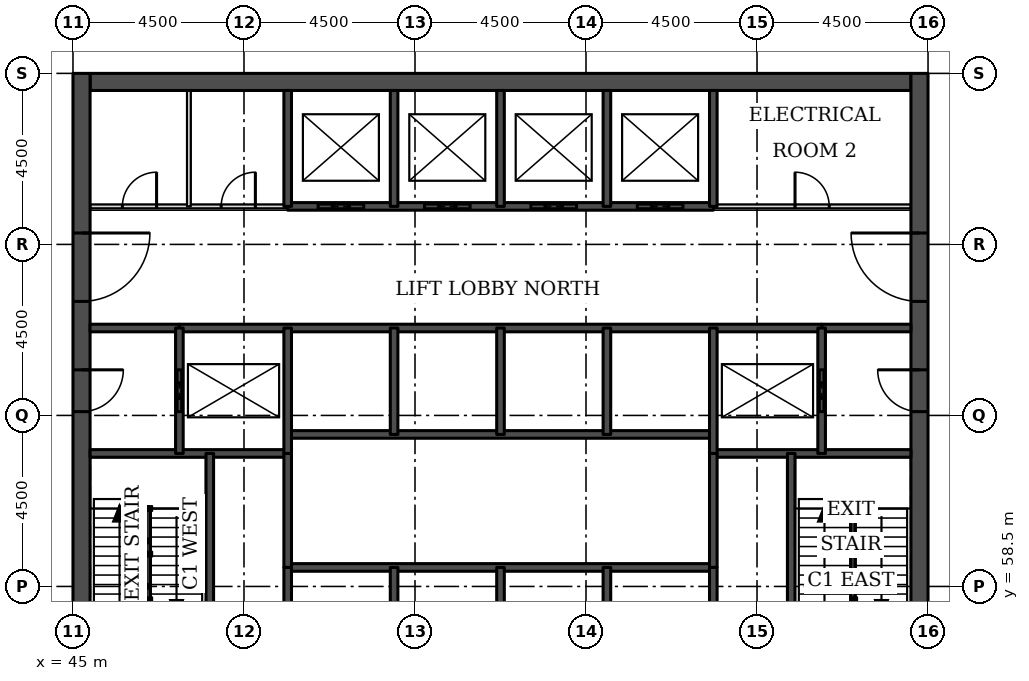
"""IFC4 building model, lengths in metres.
Left out: names, types, materials, properties, quantities, classifications, styles, units other than length and angle.
Written with IfcOpenShell. Run it as: python <this file> out.ifc"""

import sys

from ifc_helpers import new_model, si_unit, direction, frame, frame_2d, origin, place, context, subcontext, project, spatial, rectangle, extrude, element, fill, save


model = new_model("IFC4")
c1 = context("Model", 3, precision=1e-05, world=origin(), true_north=direction((0.0, 1.0)))
c2 = subcontext(c1, "Body", "Model", "MODEL_VIEW")
j1 = project(units=[si_unit("LENGTHUNIT", "METRE"), si_unit("PLANEANGLEUNIT", "RADIAN")], contexts=[c1])
p1 = place(None, origin())
s1 = spatial("IfcSite", under=j1, at=p1, CompositionType="ELEMENT")
p2 = place(p1, origin())
s2 = spatial("IfcBuilding", under=s1, at=p2, CompositionType="ELEMENT")
p3 = place(p2, frame((0.0, 0.0, 127.0)))
s3 = spatial("IfcBuildingStorey", under=s2, at=p3, CompositionType="ELEMENT", Elevation=127.0)
p4 = place(p3, frame((45.45, 71.775, 0.0), z_axis=(0.0, 0.0, 1.0), x_axis=(1.0, 0.0, 0.0)))
e1 = element("IfcWall", 1, at=p4, inside=s3, PredefinedType="SHEAR", context=c2, shape_type="SweptSolid", body=[
    extrude(rectangle(XDim=21.6, YDim=0.45, at=frame_2d((10.8, 0.0))), origin(), (0.0, 0.0, 1.0), 3.7),
])
p5 = place(p3, frame((45.225, 49.5, 0.0), z_axis=(0.0, 0.0, 1.0), x_axis=(0.0, 1.0, 0.0)))
e2 = element("IfcWall", 2, at=p5, inside=s3, PredefinedType="SHEAR", context=c2, shape_type="SweptSolid", body=[
    extrude(rectangle(XDim=22.5, YDim=0.45, at=frame_2d((11.25, 0.0))), origin(), (0.0, 0.0, 1.0), 3.7),
])
p6 = place(p5, frame((4.2, 0.0, 0.0)))
e3 = element("IfcOpeningElement", 3, at=p6, cuts=e2, PredefinedType="OPENING", context=c2, shape_type="SweptSolid", body=[
    extrude(rectangle(XDim=1.8, YDim=2.1, at=frame_2d((0.9, 1.05))), frame((0.0, 0.235, 0.0), z_axis=(0.0, -1.0, 0.0), x_axis=(1.0, 0.0, 0.0)), (0.0, 0.0, 1.0), 0.47),
])
p7 = place(p5, frame((6.9, 0.0, 0.0)))
e4 = element("IfcOpeningElement", 4, at=p7, cuts=e2, PredefinedType="OPENING", context=c2, shape_type="SweptSolid", body=[
    extrude(rectangle(XDim=1.1, YDim=2.1, at=frame_2d((0.55, 1.05))), frame((0.0, 0.235, 0.0), z_axis=(0.0, -1.0, 0.0), x_axis=(1.0, 0.0, 0.0)), (0.0, 0.0, 1.0), 0.47),
])
p8 = place(p5, frame((13.6, 0.0, 0.0)))
e5 = element("IfcOpeningElement", 5, at=p8, cuts=e2, PredefinedType="OPENING", context=c2, shape_type="SweptSolid", body=[
    extrude(rectangle(XDim=1.1, YDim=2.1, at=frame_2d((0.55, 1.05))), frame((0.0, 0.235, 0.0), z_axis=(0.0, -1.0, 0.0), x_axis=(1.0, 0.0, 0.0)), (0.0, 0.0, 1.0), 0.47),
])
p9 = place(p5, frame((16.5, 0.0, 0.0)))
e6 = element("IfcOpeningElement", 6, at=p9, cuts=e2, PredefinedType="OPENING", context=c2, shape_type="SweptSolid", body=[
    extrude(rectangle(XDim=1.8, YDim=2.1, at=frame_2d((0.9, 1.05))), frame((0.0, 0.235, 0.0), z_axis=(0.0, -1.0, 0.0), x_axis=(1.0, 0.0, 0.0)), (0.0, 0.0, 1.0), 0.47),
])
p10 = place(p3, frame((67.275, 49.5, 0.0), z_axis=(0.0, 0.0, 1.0), x_axis=(0.0, 1.0, 0.0)))
e7 = element("IfcWall", 7, at=p10, inside=s3, PredefinedType="SHEAR", context=c2, shape_type="SweptSolid", body=[
    extrude(rectangle(XDim=22.5, YDim=0.45, at=frame_2d((11.25, 0.0))), origin(), (0.0, 0.0, 1.0), 3.7),
])
p11 = place(p10, frame((4.2, 0.0, 0.0)))
e8 = element("IfcOpeningElement", 8, at=p11, cuts=e7, PredefinedType="OPENING", context=c2, shape_type="SweptSolid", body=[
    extrude(rectangle(XDim=1.8, YDim=2.1, at=frame_2d((0.9, 1.05))), frame((0.0, 0.235, 0.0), z_axis=(0.0, -1.0, 0.0), x_axis=(1.0, 0.0, 0.0)), (0.0, 0.0, 1.0), 0.47),
])
p12 = place(p10, frame((6.9, 0.0, 0.0)))
e9 = element("IfcOpeningElement", 9, at=p12, cuts=e7, PredefinedType="OPENING", context=c2, shape_type="SweptSolid", body=[
    extrude(rectangle(XDim=1.1, YDim=2.1, at=frame_2d((0.55, 1.05))), frame((0.0, 0.235, 0.0), z_axis=(0.0, -1.0, 0.0), x_axis=(1.0, 0.0, 0.0)), (0.0, 0.0, 1.0), 0.47),
])
p13 = place(p10, frame((13.6, 0.0, 0.0)))
e10 = element("IfcOpeningElement", 10, at=p13, cuts=e7, PredefinedType="OPENING", context=c2, shape_type="SweptSolid", body=[
    extrude(rectangle(XDim=1.1, YDim=2.1, at=frame_2d((0.55, 1.05))), frame((0.0, 0.235, 0.0), z_axis=(0.0, -1.0, 0.0), x_axis=(1.0, 0.0, 0.0)), (0.0, 0.0, 1.0), 0.47),
])
p14 = place(p10, frame((16.5, 0.0, 0.0)))
e11 = element("IfcOpeningElement", 11, at=p14, cuts=e7, PredefinedType="OPENING", context=c2, shape_type="SweptSolid", body=[
    extrude(rectangle(XDim=1.8, YDim=2.1, at=frame_2d((0.9, 1.05))), frame((0.0, 0.235, 0.0), z_axis=(0.0, -1.0, 0.0), x_axis=(1.0, 0.0, 0.0)), (0.0, 0.0, 1.0), 0.47),
])
p15 = place(p3, frame((50.65, 59.0, 0.0), z_axis=(0.0, 0.0, 1.0), x_axis=(1.0, 0.0, 0.0)))
e12 = element("IfcWall", 12, at=p15, inside=s3, PredefinedType="SOLIDWALL", context=c2, shape_type="SweptSolid", body=[
    extrude(rectangle(XDim=11.2, YDim=0.2, at=frame_2d((5.6, 0.0))), origin(), (0.0, 0.0, 1.0), 3.7),
])
for number, where, z_axis, x_axis in (
    (13, (45.45, 62.0, 0.0), (0.0, 0.0, 1.0), (1.0, 0.0, 0.0)),
    (14, (61.85, 62.0, 0.0), (0.0, 0.0, 1.0), (1.0, 0.0, 0.0)),
):
    element("IfcWall", number, at=place(p3, frame(where, z_axis=z_axis, x_axis=x_axis)), inside=s3, PredefinedType="SOLIDWALL", context=c2, shape_type="SweptSolid", body=[
        extrude(rectangle(XDim=5.2, YDim=0.2, at=frame_2d((2.6, 0.0))), origin(), (0.0, 0.0, 1.0), 3.55),
    ])
p16 = place(p3, frame((50.65, 62.5, 0.0), z_axis=(0.0, 0.0, 1.0), x_axis=(1.0, 0.0, 0.0)))
e15 = element("IfcWall", 15, at=p16, inside=s3, PredefinedType="SOLIDWALL", context=c2, shape_type="SweptSolid", body=[
    extrude(rectangle(XDim=11.2, YDim=0.2, at=frame_2d((5.6, 0.0))), origin(), (0.0, 0.0, 1.0), 3.7),
])
for number, where, z_axis, x_axis in (
    (16, (45.45, 65.3, 0.0), (0.0, 0.0, 1.0), (1.0, 0.0, 0.0)),
    (17, (64.7, 65.3, 0.0), (0.0, 0.0, 1.0), (1.0, 0.0, 0.0)),
):
    element("IfcWall", number, at=place(p3, frame(where, z_axis=z_axis, x_axis=x_axis)), inside=s3, PredefinedType="SOLIDWALL", context=c2, shape_type="SweptSolid", body=[
        extrude(rectangle(XDim=2.35, YDim=0.2, at=frame_2d((1.175, 0.0))), origin(), (0.0, 0.0, 1.0), 3.55),
    ])
p17 = place(p3, frame((47.8, 65.3, 0.0), z_axis=(0.0, 0.0, 1.0), x_axis=(1.0, 0.0, 0.0)))
e18 = element("IfcWall", 18, at=p17, inside=s3, PredefinedType="SOLIDWALL", context=c2, shape_type="SweptSolid", body=[
    extrude(rectangle(XDim=16.9, YDim=0.2, at=frame_2d((8.45, 0.0))), origin(), (0.0, 0.0, 1.0), 3.55),
])
p18 = place(p3, frame((45.45, 68.5, 0.0), z_axis=(0.0, 0.0, 1.0), x_axis=(1.0, 0.0, 0.0)))
e19 = element("IfcWall", 19, at=p18, inside=s3, PredefinedType="PARTITIONING", context=c2, shape_type="SweptSolid", body=[
    extrude(rectangle(XDim=5.2, YDim=0.1, at=frame_2d((2.6, 0.0))), origin(), (0.0, 0.0, 1.0), 3.55),
])
p19 = place(p18, frame((0.85, 0.0, 0.0)))
e20 = element("IfcOpeningElement", 20, at=p19, cuts=e19, PredefinedType="OPENING", context=c2, shape_type="SweptSolid", body=[
    extrude(rectangle(XDim=0.9, YDim=2.1, at=frame_2d((0.45, 1.05))), frame((0.0, 0.06, 0.0), z_axis=(0.0, -1.0, 0.0), x_axis=(1.0, 0.0, 0.0)), (0.0, 0.0, 1.0), 0.12),
])
p20 = place(p18, frame((3.45, 0.0, 0.0)))
e21 = element("IfcOpeningElement", 21, at=p20, cuts=e19, PredefinedType="OPENING", context=c2, shape_type="SweptSolid", body=[
    extrude(rectangle(XDim=0.9, YDim=2.1, at=frame_2d((0.45, 1.05))), frame((0.0, 0.06, 0.0), z_axis=(0.0, -1.0, 0.0), x_axis=(1.0, 0.0, 0.0)), (0.0, 0.0, 1.0), 0.12),
])
p21 = place(p3, frame((61.85, 68.5, 0.0), z_axis=(0.0, 0.0, 1.0), x_axis=(1.0, 0.0, 0.0)))
e22 = element("IfcWall", 22, at=p21, inside=s3, PredefinedType="PARTITIONING", context=c2, shape_type="SweptSolid", body=[
    extrude(rectangle(XDim=5.2, YDim=0.1, at=frame_2d((2.6, 0.0))), origin(), (0.0, 0.0, 1.0), 3.55),
])
p22 = place(p21, frame((2.15, 0.0, 0.0)))
e23 = element("IfcOpeningElement", 23, at=p22, cuts=e22, PredefinedType="OPENING", context=c2, shape_type="SweptSolid", body=[
    extrude(rectangle(XDim=0.9, YDim=2.1, at=frame_2d((0.45, 1.05))), frame((0.0, 0.06, 0.0), z_axis=(0.0, -1.0, 0.0), x_axis=(1.0, 0.0, 0.0)), (0.0, 0.0, 1.0), 0.12),
])
p23 = place(p3, frame((50.65, 68.5, 0.0), z_axis=(0.0, 0.0, 1.0), x_axis=(1.0, 0.0, 0.0)))
e24 = element("IfcWall", 24, at=p23, inside=s3, PredefinedType="SOLIDWALL", context=c2, shape_type="SweptSolid", body=[
    extrude(rectangle(XDim=11.2, YDim=0.2, at=frame_2d((5.6, 0.0))), origin(), (0.0, 0.0, 1.0), 3.55),
])
p24 = place(p23, frame((0.8, 0.0, 0.0)))
e25 = element("IfcOpeningElement", 25, at=p24, cuts=e24, PredefinedType="OPENING", context=c2, shape_type="SweptSolid", body=[
    extrude(rectangle(XDim=1.2, YDim=2.1, at=frame_2d((0.6, 1.05))), frame((0.0, 0.11, 0.0), z_axis=(0.0, -1.0, 0.0), x_axis=(1.0, 0.0, 0.0)), (0.0, 0.0, 1.0), 0.22),
])
p25 = place(p23, frame((3.6, 0.0, 0.0)))
e26 = element("IfcOpeningElement", 26, at=p25, cuts=e24, PredefinedType="OPENING", context=c2, shape_type="SweptSolid", body=[
    extrude(rectangle(XDim=1.2, YDim=2.1, at=frame_2d((0.6, 1.05))), frame((0.0, 0.11, 0.0), z_axis=(0.0, -1.0, 0.0), x_axis=(1.0, 0.0, 0.0)), (0.0, 0.0, 1.0), 0.22),
])
p26 = place(p23, frame((6.4, 0.0, 0.0)))
e27 = element("IfcOpeningElement", 27, at=p26, cuts=e24, PredefinedType="OPENING", context=c2, shape_type="SweptSolid", body=[
    extrude(rectangle(XDim=1.2, YDim=2.1, at=frame_2d((0.6, 1.05))), frame((0.0, 0.11, 0.0), z_axis=(0.0, -1.0, 0.0), x_axis=(1.0, 0.0, 0.0)), (0.0, 0.0, 1.0), 0.22),
])
p27 = place(p23, frame((9.2, 0.0, 0.0)))
e28 = element("IfcOpeningElement", 28, at=p27, cuts=e24, PredefinedType="OPENING", context=c2, shape_type="SweptSolid", body=[
    extrude(rectangle(XDim=1.2, YDim=2.1, at=frame_2d((0.6, 1.05))), frame((0.0, 0.11, 0.0), z_axis=(0.0, -1.0, 0.0), x_axis=(1.0, 0.0, 0.0)), (0.0, 0.0, 1.0), 0.22),
])
p28 = place(p3, frame((47.8, 62.0, 0.0), z_axis=(0.0, 0.0, 1.0), x_axis=(0.0, 1.0, 0.0)))
e29 = element("IfcWall", 29, at=p28, inside=s3, PredefinedType="SOLIDWALL", context=c2, shape_type="SweptSolid", body=[
    extrude(rectangle(XDim=3.3, YDim=0.2, at=frame_2d((1.65, 0.0))), origin(), (0.0, 0.0, 1.0), 3.55),
])
p29 = place(p28, frame((1.1, 0.0, 0.0)))
e30 = element("IfcOpeningElement", 30, at=p29, cuts=e29, PredefinedType="OPENING", context=c2, shape_type="SweptSolid", body=[
    extrude(rectangle(XDim=1.1, YDim=2.1, at=frame_2d((0.55, 1.05))), frame((0.0, 0.11, 0.0), z_axis=(0.0, -1.0, 0.0), x_axis=(1.0, 0.0, 0.0)), (0.0, 0.0, 1.0), 0.22),
])
p30 = place(p3, frame((48.05, 68.5, 0.0), z_axis=(0.0, 0.0, 1.0), x_axis=(0.0, 1.0, 0.0)))
e31 = element("IfcWall", 31, at=p30, inside=s3, PredefinedType="PARTITIONING", context=c2, shape_type="SweptSolid", body=[
    extrude(rectangle(XDim=3.05, YDim=0.1, at=frame_2d((1.525, 0.0))), origin(), (0.0, 0.0, 1.0), 3.55),
])
p31 = place(p3, frame((48.6, 56.2, 0.0), z_axis=(0.0, 0.0, 1.0), x_axis=(0.0, 1.0, 0.0)))
e32 = element("IfcWall", 32, at=p31, inside=s3, PredefinedType="SOLIDWALL", context=c2, shape_type="SweptSolid", body=[
    extrude(rectangle(XDim=5.8, YDim=0.2, at=frame_2d((2.9, 0.0))), origin(), (0.0, 0.0, 1.0), 3.55),
])
p32 = place(p3, frame((50.65, 59.0, 0.0), z_axis=(0.0, 0.0, 1.0), x_axis=(0.0, 1.0, 0.0)))
e33 = element("IfcWall", 33, at=p32, inside=s3, PredefinedType="SOLIDWALL", context=c2, shape_type="SweptSolid", body=[
    extrude(rectangle(XDim=3.0, YDim=0.2, at=frame_2d((1.5, 0.0))), origin(), (0.0, 0.0, 1.0), 3.7),
])
p33 = place(p3, frame((50.65, 56.2, 0.0), z_axis=(0.0, 0.0, 1.0), x_axis=(0.0, 1.0, 0.0)))
e34 = element("IfcWall", 34, at=p33, inside=s3, PredefinedType="SOLIDWALL", context=c2, shape_type="SweptSolid", body=[
    extrude(rectangle(XDim=2.8, YDim=0.2, at=frame_2d((1.4, 0.0))), origin(), (0.0, 0.0, 1.0), 3.55),
])
p34 = place(p3, frame((50.65, 62.0, 0.0), z_axis=(0.0, 0.0, 1.0), x_axis=(0.0, 1.0, 0.0)))
e35 = element("IfcWall", 35, at=p34, inside=s3, PredefinedType="SOLIDWALL", context=c2, shape_type="SweptSolid", body=[
    extrude(rectangle(XDim=3.3, YDim=0.2, at=frame_2d((1.65, 0.0))), origin(), (0.0, 0.0, 1.0), 3.55),
])
p35 = place(p3, frame((50.65, 68.5, 0.0), z_axis=(0.0, 0.0, 1.0), x_axis=(0.0, 1.0, 0.0)))
e36 = element("IfcWall", 36, at=p35, inside=s3, PredefinedType="SOLIDWALL", context=c2, shape_type="SweptSolid", body=[
    extrude(rectangle(XDim=3.05, YDim=0.2, at=frame_2d((1.525, 0.0))), origin(), (0.0, 0.0, 1.0), 3.55),
])
for number, where, z_axis, x_axis in (
    (37, (53.45, 56.2, 0.0), (0.0, 0.0, 1.0), (0.0, 1.0, 0.0)),
    (38, (53.45, 62.5, 0.0), (0.0, 0.0, 1.0), (0.0, 1.0, 0.0)),
):
    element("IfcWall", number, at=place(p3, frame(where, z_axis=z_axis, x_axis=x_axis)), inside=s3, PredefinedType="SOLIDWALL", context=c2, shape_type="SweptSolid", body=[
        extrude(rectangle(XDim=2.8, YDim=0.2, at=frame_2d((1.4, 0.0))), origin(), (0.0, 0.0, 1.0), 3.55),
    ])
p36 = place(p3, frame((53.45, 68.5, 0.0), z_axis=(0.0, 0.0, 1.0), x_axis=(0.0, 1.0, 0.0)))
e39 = element("IfcWall", 39, at=p36, inside=s3, PredefinedType="SOLIDWALL", context=c2, shape_type="SweptSolid", body=[
    extrude(rectangle(XDim=3.05, YDim=0.2, at=frame_2d((1.525, 0.0))), origin(), (0.0, 0.0, 1.0), 3.55),
])
for number, where, z_axis, x_axis in (
    (40, (56.25, 56.2, 0.0), (0.0, 0.0, 1.0), (0.0, 1.0, 0.0)),
    (41, (56.25, 62.5, 0.0), (0.0, 0.0, 1.0), (0.0, 1.0, 0.0)),
):
    element("IfcWall", number, at=place(p3, frame(where, z_axis=z_axis, x_axis=x_axis)), inside=s3, PredefinedType="SOLIDWALL", context=c2, shape_type="SweptSolid", body=[
        extrude(rectangle(XDim=2.8, YDim=0.2, at=frame_2d((1.4, 0.0))), origin(), (0.0, 0.0, 1.0), 3.55),
    ])
p37 = place(p3, frame((56.25, 68.5, 0.0), z_axis=(0.0, 0.0, 1.0), x_axis=(0.0, 1.0, 0.0)))
e42 = element("IfcWall", 42, at=p37, inside=s3, PredefinedType="SOLIDWALL", context=c2, shape_type="SweptSolid", body=[
    extrude(rectangle(XDim=3.05, YDim=0.2, at=frame_2d((1.525, 0.0))), origin(), (0.0, 0.0, 1.0), 3.55),
])
for number, where, z_axis, x_axis in (
    (43, (59.05, 56.2, 0.0), (0.0, 0.0, 1.0), (0.0, 1.0, 0.0)),
    (44, (59.05, 62.5, 0.0), (0.0, 0.0, 1.0), (0.0, 1.0, 0.0)),
):
    element("IfcWall", number, at=place(p3, frame(where, z_axis=z_axis, x_axis=x_axis)), inside=s3, PredefinedType="SOLIDWALL", context=c2, shape_type="SweptSolid", body=[
        extrude(rectangle(XDim=2.8, YDim=0.2, at=frame_2d((1.4, 0.0))), origin(), (0.0, 0.0, 1.0), 3.55),
    ])
p38 = place(p3, frame((59.05, 68.5, 0.0), z_axis=(0.0, 0.0, 1.0), x_axis=(0.0, 1.0, 0.0)))
e45 = element("IfcWall", 45, at=p38, inside=s3, PredefinedType="SOLIDWALL", context=c2, shape_type="SweptSolid", body=[
    extrude(rectangle(XDim=3.05, YDim=0.2, at=frame_2d((1.525, 0.0))), origin(), (0.0, 0.0, 1.0), 3.55),
])
p39 = place(p3, frame((61.85, 59.0, 0.0), z_axis=(0.0, 0.0, 1.0), x_axis=(0.0, 1.0, 0.0)))
e46 = element("IfcWall", 46, at=p39, inside=s3, PredefinedType="SOLIDWALL", context=c2, shape_type="SweptSolid", body=[
    extrude(rectangle(XDim=3.0, YDim=0.2, at=frame_2d((1.5, 0.0))), origin(), (0.0, 0.0, 1.0), 3.7),
])
p40 = place(p3, frame((61.85, 56.2, 0.0), z_axis=(0.0, 0.0, 1.0), x_axis=(0.0, 1.0, 0.0)))
e47 = element("IfcWall", 47, at=p40, inside=s3, PredefinedType="SOLIDWALL", context=c2, shape_type="SweptSolid", body=[
    extrude(rectangle(XDim=2.8, YDim=0.2, at=frame_2d((1.4, 0.0))), origin(), (0.0, 0.0, 1.0), 3.55),
])
p41 = place(p3, frame((61.85, 62.0, 0.0), z_axis=(0.0, 0.0, 1.0), x_axis=(0.0, 1.0, 0.0)))
e48 = element("IfcWall", 48, at=p41, inside=s3, PredefinedType="SOLIDWALL", context=c2, shape_type="SweptSolid", body=[
    extrude(rectangle(XDim=3.3, YDim=0.2, at=frame_2d((1.65, 0.0))), origin(), (0.0, 0.0, 1.0), 3.55),
])
p42 = place(p3, frame((61.85, 68.5, 0.0), z_axis=(0.0, 0.0, 1.0), x_axis=(0.0, 1.0, 0.0)))
e49 = element("IfcWall", 49, at=p42, inside=s3, PredefinedType="SOLIDWALL", context=c2, shape_type="SweptSolid", body=[
    extrude(rectangle(XDim=3.05, YDim=0.2, at=frame_2d((1.525, 0.0))), origin(), (0.0, 0.0, 1.0), 3.55),
])
p43 = place(p3, frame((63.9, 56.2, 0.0), z_axis=(0.0, 0.0, 1.0), x_axis=(0.0, 1.0, 0.0)))
e50 = element("IfcWall", 50, at=p43, inside=s3, PredefinedType="SOLIDWALL", context=c2, shape_type="SweptSolid", body=[
    extrude(rectangle(XDim=5.8, YDim=0.2, at=frame_2d((2.9, 0.0))), origin(), (0.0, 0.0, 1.0), 3.55),
])
p44 = place(p3, frame((64.7, 62.0, 0.0), z_axis=(0.0, 0.0, 1.0), x_axis=(0.0, 1.0, 0.0)))
e51 = element("IfcWall", 51, at=p44, inside=s3, PredefinedType="SOLIDWALL", context=c2, shape_type="SweptSolid", body=[
    extrude(rectangle(XDim=3.3, YDim=0.2, at=frame_2d((1.65, 0.0))), origin(), (0.0, 0.0, 1.0), 3.55),
])
p45 = place(p44, frame((1.1, 0.0, 0.0)))
e52 = element("IfcOpeningElement", 52, at=p45, cuts=e51, PredefinedType="OPENING", context=c2, shape_type="SweptSolid", body=[
    extrude(rectangle(XDim=1.1, YDim=2.1, at=frame_2d((0.55, 1.05))), frame((0.0, 0.11, 0.0), z_axis=(0.0, -1.0, 0.0), x_axis=(1.0, 0.0, 0.0)), (0.0, 0.0, 1.0), 0.22),
])
p46 = place(p24, origin())
e53 = element("IfcDoor", 53, at=p46, inside=s3, OperationType="DOUBLE_DOOR_SLIDING", PredefinedType="DOOR", context=c2, shape_type="SweptSolid", body=[
    extrude(rectangle(XDim=1.2, YDim=2.1, at=frame_2d((0.6, 1.05))), frame((0.0, 0.025, 0.0), z_axis=(0.0, -1.0, 0.0), x_axis=(1.0, 0.0, 0.0)), (0.0, 0.0, 1.0), 0.05),
])
fill(e25, e53)
p47 = place(p25, origin())
e54 = element("IfcDoor", 54, at=p47, inside=s3, OperationType="DOUBLE_DOOR_SLIDING", PredefinedType="DOOR", context=c2, shape_type="SweptSolid", body=[
    extrude(rectangle(XDim=1.2, YDim=2.1, at=frame_2d((0.6, 1.05))), frame((0.0, 0.025, 0.0), z_axis=(0.0, -1.0, 0.0), x_axis=(1.0, 0.0, 0.0)), (0.0, 0.0, 1.0), 0.05),
])
fill(e26, e54)
p48 = place(p26, origin())
e55 = element("IfcDoor", 55, at=p48, inside=s3, OperationType="DOUBLE_DOOR_SLIDING", PredefinedType="DOOR", context=c2, shape_type="SweptSolid", body=[
    extrude(rectangle(XDim=1.2, YDim=2.1, at=frame_2d((0.6, 1.05))), frame((0.0, 0.025, 0.0), z_axis=(0.0, -1.0, 0.0), x_axis=(1.0, 0.0, 0.0)), (0.0, 0.0, 1.0), 0.05),
])
fill(e27, e55)
p49 = place(p27, origin())
e56 = element("IfcDoor", 56, at=p49, inside=s3, OperationType="DOUBLE_DOOR_SLIDING", PredefinedType="DOOR", context=c2, shape_type="SweptSolid", body=[
    extrude(rectangle(XDim=1.2, YDim=2.1, at=frame_2d((0.6, 1.05))), frame((0.0, 0.025, 0.0), z_axis=(0.0, -1.0, 0.0), x_axis=(1.0, 0.0, 0.0)), (0.0, 0.0, 1.0), 0.05),
])
fill(e28, e56)
p50 = place(p29, origin())
e57 = element("IfcDoor", 57, at=p50, inside=s3, OperationType="DOUBLE_DOOR_SLIDING", PredefinedType="DOOR", context=c2, shape_type="SweptSolid", body=[
    extrude(rectangle(XDim=1.1, YDim=2.1, at=frame_2d((0.55, 1.05))), frame((0.0, 0.025, 0.0), z_axis=(0.0, -1.0, 0.0), x_axis=(1.0, 0.0, 0.0)), (0.0, 0.0, 1.0), 0.05),
])
fill(e30, e57)
p51 = place(p45, origin())
e58 = element("IfcDoor", 58, at=p51, inside=s3, OperationType="DOUBLE_DOOR_SLIDING", PredefinedType="DOOR", context=c2, shape_type="SweptSolid", body=[
    extrude(rectangle(XDim=1.1, YDim=2.1, at=frame_2d((0.55, 1.05))), frame((0.0, 0.025, 0.0), z_axis=(0.0, -1.0, 0.0), x_axis=(1.0, 0.0, 0.0)), (0.0, 0.0, 1.0), 0.05),
])
fill(e52, e58)
p52 = place(p8, frame((1.1, 0.0, 0.0), z_axis=(0.0, 0.0, 1.0), x_axis=(-1.0, 0.0, 0.0)))
e59 = element("IfcDoor", 59, at=p52, inside=s3, OperationType="SINGLE_SWING_LEFT", PredefinedType="DOOR", context=c2, shape_type="SweptSolid", body=[
    extrude(rectangle(XDim=1.1, YDim=2.1, at=frame_2d((0.55, 1.05))), frame((0.0, 0.025, 0.0), z_axis=(0.0, -1.0, 0.0), x_axis=(1.0, 0.0, 0.0)), (0.0, 0.0, 1.0), 0.05),
])
fill(e5, e59)
p53 = place(p9, frame((1.8, 0.0, 0.0), z_axis=(0.0, 0.0, 1.0), x_axis=(-1.0, 0.0, 0.0)))
e60 = element("IfcDoor", 60, at=p53, inside=s3, OperationType="SINGLE_SWING_LEFT", PredefinedType="DOOR", context=c2, shape_type="SweptSolid", body=[
    extrude(rectangle(XDim=1.8, YDim=2.1, at=frame_2d((0.9, 1.05))), frame((0.0, 0.025, 0.0), z_axis=(0.0, -1.0, 0.0), x_axis=(1.0, 0.0, 0.0)), (0.0, 0.0, 1.0), 0.05),
])
fill(e6, e60)
p54 = place(p13, origin())
e61 = element("IfcDoor", 61, at=p54, inside=s3, OperationType="SINGLE_SWING_RIGHT", PredefinedType="DOOR", context=c2, shape_type="SweptSolid", body=[
    extrude(rectangle(XDim=1.1, YDim=2.1, at=frame_2d((0.55, 1.05))), frame((0.0, 0.025, 0.0), z_axis=(0.0, -1.0, 0.0), x_axis=(1.0, 0.0, 0.0)), (0.0, 0.0, 1.0), 0.05),
])
fill(e10, e61)
p55 = place(p14, origin())
e62 = element("IfcDoor", 62, at=p55, inside=s3, OperationType="SINGLE_SWING_RIGHT", PredefinedType="DOOR", context=c2, shape_type="SweptSolid", body=[
    extrude(rectangle(XDim=1.8, YDim=2.1, at=frame_2d((0.9, 1.05))), frame((0.0, 0.025, 0.0), z_axis=(0.0, -1.0, 0.0), x_axis=(1.0, 0.0, 0.0)), (0.0, 0.0, 1.0), 0.05),
])
fill(e11, e62)
p56 = place(p22, origin())
e63 = element("IfcDoor", 63, at=p56, inside=s3, OperationType="SINGLE_SWING_LEFT", PredefinedType="DOOR", context=c2, shape_type="SweptSolid", body=[
    extrude(rectangle(XDim=0.9, YDim=2.1, at=frame_2d((0.45, 1.05))), frame((0.0, 0.025, 0.0), z_axis=(0.0, -1.0, 0.0), x_axis=(1.0, 0.0, 0.0)), (0.0, 0.0, 1.0), 0.05),
])
fill(e23, e63)
p57 = place(p19, origin())
e64 = element("IfcDoor", 64, at=p57, inside=s3, OperationType="SINGLE_SWING_RIGHT", PredefinedType="DOOR", context=c2, shape_type="SweptSolid", body=[
    extrude(rectangle(XDim=0.9, YDim=2.1, at=frame_2d((0.45, 1.05))), frame((0.0, 0.025, 0.0), z_axis=(0.0, -1.0, 0.0), x_axis=(1.0, 0.0, 0.0)), (0.0, 0.0, 1.0), 0.05),
])
fill(e20, e64)
p58 = place(p20, origin())
e65 = element("IfcDoor", 65, at=p58, inside=s3, OperationType="SINGLE_SWING_RIGHT", PredefinedType="DOOR", context=c2, shape_type="SweptSolid", body=[
    extrude(rectangle(XDim=0.9, YDim=2.1, at=frame_2d((0.45, 1.05))), frame((0.0, 0.025, 0.0), z_axis=(0.0, -1.0, 0.0), x_axis=(1.0, 0.0, 0.0)), (0.0, 0.0, 1.0), 0.05),
])
fill(e21, e65)
save(model, sys.argv[1])
